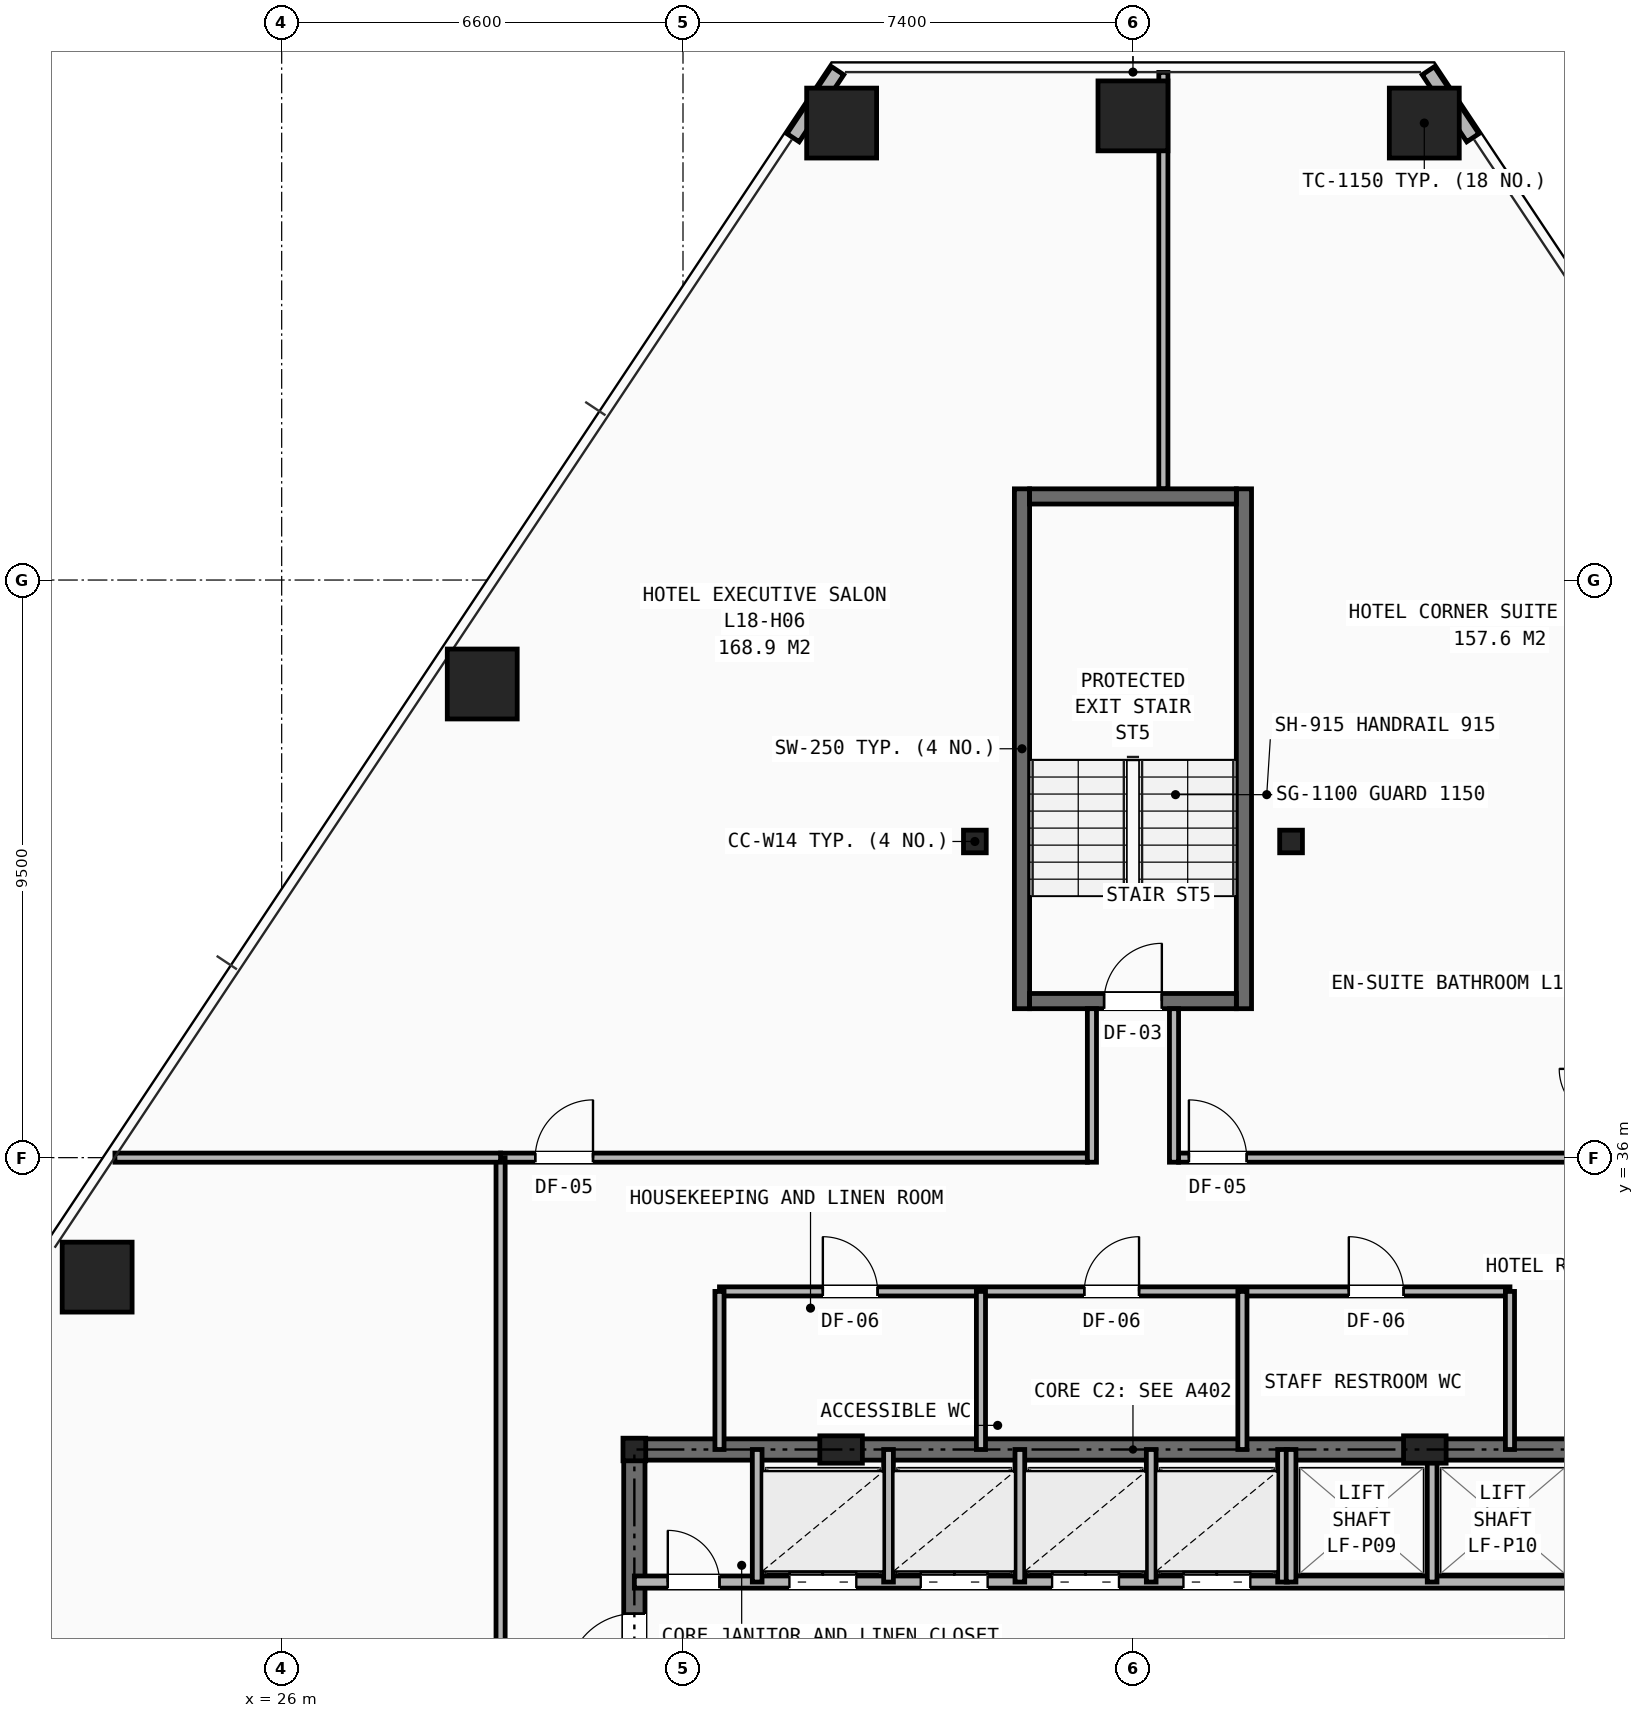
"""IFC4 building model, lengths in metres.
Left out: names, types, materials, properties, quantities, classifications, styles, units other than length and angle.
Written with IfcOpenShell. Run it as: python <this file> out.ifc"""

import sys

from ifc_helpers import new_model, si_unit, direction, frame, frame_2d, origin, origin_2d, place, context, subcontext, project, spatial, rectangle, hollow_rectangle, i_section, extrude, element, fill, save


model = new_model("IFC4")
c1 = context("Model", 3, precision=1e-05, world=origin(), true_north=direction((0.0, 1.0)))
c2 = subcontext(c1, "Body", "Model", "MODEL_VIEW")
j1 = project(units=[si_unit("LENGTHUNIT", "METRE"), si_unit("PLANEANGLEUNIT", "RADIAN")], contexts=[c1])
p1 = place(None, origin())
s1 = spatial("IfcSite", under=j1, at=p1, CompositionType="ELEMENT")
p2 = place(p1, origin())
s2 = spatial("IfcBuilding", under=s1, at=p2, CompositionType="ELEMENT")
p3 = place(p2, frame((0.0, 0.0, 65.6)))
s3 = spatial("IfcBuildingStorey", under=s2, at=p3, CompositionType="ELEMENT", Elevation=65.6)
for number, where, z_axis, x_axis in (
    (1, (31.8, 31.2, 0.0), (0.0, 0.0, 1.0), (1.0, 0.0, 0.0)),
    (2, (37.4, 41.2, 0.0), (0.0, 0.0, 1.0), (1.0, 0.0, 0.0)),
    (3, (42.6, 41.2, 0.0), (0.0, 0.0, 1.0), (1.0, 0.0, 0.0)),
):
    element("IfcColumn", number, at=place(p3, frame(where, z_axis=z_axis, x_axis=x_axis)), inside=s3, PredefinedType="COLUMN", context=c2, shape_type="SweptSolid", body=[
        extrude(i_section(OverallWidth=0.374, OverallDepth=0.372, WebThickness=0.016, FlangeThickness=0.026, at=origin_2d()), origin(), (0.0, 0.0, 1.0), 3.2),
    ])
for number, where, z_axis, x_axis in (
    (4, (35.2, 31.2, 0.0), (0.0, 0.0, 1.0), (1.0, 0.0, 0.0)),
    (5, (44.8, 31.2, 0.0), (0.0, 0.0, 1.0), (1.0, 0.0, 0.0)),
):
    element("IfcColumn", number, at=place(p3, frame(where, z_axis=z_axis, x_axis=x_axis)), inside=s3, PredefinedType="PILASTER", context=c2, shape_type="SweptSolid", body=[
        extrude(rectangle(XDim=0.7, YDim=0.45, at=origin_2d()), origin(), (0.0, 0.0, 1.0), 3.2),
    ])
for number, where, z_axis, x_axis in (
    (6, (44.791, 53.016, 0.0), (0.0, 0.0, 1.0), (1.0, 0.0, 0.0)),
    (7, (40.0, 53.134, 0.0), (0.0, 0.0, 1.0), (1.0, 0.0, 0.0)),
    (8, (35.209, 53.016, 0.0), (0.0, 0.0, 1.0), (1.0, 0.0, 0.0)),
    (9, (29.299, 43.79, 0.0), (0.0, 0.0, 1.0), (1.0, 0.0, 0.0)),
    (10, (22.965, 34.035, 0.0), (0.0, 0.0, 1.0), (1.0, 0.0, 0.0)),
):
    element("IfcColumn", number, at=place(p3, frame(where, z_axis=z_axis, x_axis=x_axis)), inside=s3, PredefinedType="COLUMN", context=c2, shape_type="SweptSolid", body=[
        extrude(hollow_rectangle(XDim=1.15, YDim=1.15, WallThickness=0.075, at=origin_2d()), origin(), (0.0, 0.0, 1.0), 3.2),
    ])
for number, where, z_axis, x_axis in (
    (11, (35.144, 53.876, 0.0), (0.0, 0.0, 1.0), (-0.554, -0.833, 0.0)),
    (12, (45.59, 52.774, 0.0), (0.0, 0.0, 1.0), (-0.554, 0.833, 0.0)),
):
    element("IfcWall", number, at=place(p3, frame(where, z_axis=z_axis, x_axis=x_axis)), inside=s3, PredefinedType="SHEAR", context=c2, shape_type="SweptSolid", body=[
        extrude(rectangle(XDim=1.323, YDim=0.24, at=frame_2d((0.662, 0.0))), origin(), (0.0, 0.0, 1.0), 2.183),
    ])
p4 = place(p3, frame((31.8, 31.2, 0.0), z_axis=(0.0, 0.0, 1.0), x_axis=(1.0, 0.0, 0.0)))
e13 = element("IfcWall", 13, at=p4, inside=s3, PredefinedType="SHEAR", context=c2, shape_type="SweptSolid", body=[
    extrude(rectangle(XDim=16.4, YDim=0.35, at=frame_2d((8.2, 0.0))), origin(), (0.0, 0.0, 1.0), 2.9),
])
p5 = place(p3, frame((31.8, 16.4, 0.0), z_axis=(0.0, 0.0, 1.0), x_axis=(0.0, 1.0, 0.0)))
e14 = element("IfcWall", 14, at=p5, inside=s3, PredefinedType="SHEAR", context=c2, shape_type="SweptSolid", body=[
    extrude(rectangle(XDim=14.8, YDim=0.35, at=frame_2d((7.4, 0.0))), origin(), (0.0, 0.0, 1.0), 2.9),
])
p6 = place(p5, frame((11.0, 0.0, 0.0)))
e15 = element("IfcOpeningElement", 15, at=p6, cuts=e14, PredefinedType="OPENING", context=c2, shape_type="SweptSolid", body=[
    extrude(rectangle(XDim=1.1, YDim=2.15, at=frame_2d((0.55, 1.075))), frame((0.0, 0.185, 0.0), z_axis=(0.0, -1.0, 0.0), x_axis=(1.0, 0.0, 0.0)), (0.0, 0.0, 1.0), 0.37),
])
p7 = place(p3, frame((31.8, 29.02, 0.0), z_axis=(0.0, 0.0, 1.0), x_axis=(1.0, 0.0, 0.0)))
e16 = element("IfcWall", 16, at=p7, inside=s3, PredefinedType="SOLIDWALL", context=c2, shape_type="SweptSolid", body=[
    extrude(rectangle(XDim=16.4, YDim=0.2, at=frame_2d((8.2, 0.0))), origin(), (0.0, 0.0, 1.0), 2.351),
])
p8 = place(p7, frame((0.55, 0.0, 0.0)))
e17 = element("IfcOpeningElement", 17, at=p8, cuts=e16, PredefinedType="OPENING", context=c2, shape_type="SweptSolid", body=[
    extrude(rectangle(XDim=0.85, YDim=2.05, at=frame_2d((0.425, 1.025))), frame((0.0, 0.11, 0.0), z_axis=(0.0, -1.0, 0.0), x_axis=(1.0, 0.0, 0.0)), (0.0, 0.0, 1.0), 0.22),
])
p9 = place(p7, frame((2.55, 0.0, 0.0)))
e18 = element("IfcOpeningElement", 18, at=p9, cuts=e16, PredefinedType="OPENING", context=c2, shape_type="SweptSolid", body=[
    extrude(rectangle(XDim=1.1, YDim=2.15, at=frame_2d((0.55, 1.075))), frame((0.0, 0.11, 0.0), z_axis=(0.0, -1.0, 0.0), x_axis=(1.0, 0.0, 0.0)), (0.0, 0.0, 1.0), 0.22),
])
p10 = place(p7, frame((4.71, 0.0, 0.0)))
e19 = element("IfcOpeningElement", 19, at=p10, cuts=e16, PredefinedType="OPENING", context=c2, shape_type="SweptSolid", body=[
    extrude(rectangle(XDim=1.1, YDim=2.15, at=frame_2d((0.55, 1.075))), frame((0.0, 0.11, 0.0), z_axis=(0.0, -1.0, 0.0), x_axis=(1.0, 0.0, 0.0)), (0.0, 0.0, 1.0), 0.22),
])
p11 = place(p7, frame((6.87, 0.0, 0.0)))
e20 = element("IfcOpeningElement", 20, at=p11, cuts=e16, PredefinedType="OPENING", context=c2, shape_type="SweptSolid", body=[
    extrude(rectangle(XDim=1.1, YDim=2.15, at=frame_2d((0.55, 1.075))), frame((0.0, 0.11, 0.0), z_axis=(0.0, -1.0, 0.0), x_axis=(1.0, 0.0, 0.0)), (0.0, 0.0, 1.0), 0.22),
])
p12 = place(p7, frame((9.03, 0.0, 0.0)))
e21 = element("IfcOpeningElement", 21, at=p12, cuts=e16, PredefinedType="OPENING", context=c2, shape_type="SweptSolid", body=[
    extrude(rectangle(XDim=1.1, YDim=2.15, at=frame_2d((0.55, 1.075))), frame((0.0, 0.11, 0.0), z_axis=(0.0, -1.0, 0.0), x_axis=(1.0, 0.0, 0.0)), (0.0, 0.0, 1.0), 0.22),
])
for number, where, z_axis, x_axis in (
    (22, (33.82, 29.02, 0.0), (0.0, 0.0, 1.0), (0.0, 1.0, 0.0)),
    (23, (35.98, 29.02, 0.0), (0.0, 0.0, 1.0), (0.0, 1.0, 0.0)),
    (24, (38.14, 29.02, 0.0), (0.0, 0.0, 1.0), (0.0, 1.0, 0.0)),
    (25, (40.3, 29.02, 0.0), (0.0, 0.0, 1.0), (0.0, 1.0, 0.0)),
    (26, (42.46, 29.02, 0.0), (0.0, 0.0, 1.0), (0.0, 1.0, 0.0)),
    (27, (42.6, 29.02, 0.0), (0.0, 0.0, 1.0), (0.0, 1.0, 0.0)),
    (28, (44.92, 29.02, 0.0), (0.0, 0.0, 1.0), (0.0, 1.0, 0.0)),
):
    element("IfcWall", number, at=place(p3, frame(where, z_axis=z_axis, x_axis=x_axis)), inside=s3, PredefinedType="SOLIDWALL", context=c2, shape_type="SweptSolid", body=[
        extrude(rectangle(XDim=2.18, YDim=0.16, at=frame_2d((1.09, 0.0))), origin(), (0.0, 0.0, 1.0), 2.351),
    ])
p13 = place(p3, frame((33.2, 33.8, 0.0), z_axis=(0.0, 0.0, 1.0), x_axis=(1.0, 0.0, 0.0)))
e29 = element("IfcWall", 29, at=p13, inside=s3, PredefinedType="PARTITIONING", context=c2, shape_type="SweptSolid", body=[
    extrude(rectangle(XDim=13.0, YDim=0.15, at=frame_2d((6.5, 0.0))), origin(), (0.0, 0.0, 1.0), 2.9),
])
p14 = place(p13, frame((1.7, 0.0, 0.0)))
e30 = element("IfcOpeningElement", 30, at=p14, cuts=e29, PredefinedType="OPENING", context=c2, shape_type="SweptSolid", body=[
    extrude(rectangle(XDim=0.9, YDim=2.1, at=frame_2d((0.45, 1.05))), frame((0.0, 0.085, 0.0), z_axis=(0.0, -1.0, 0.0), x_axis=(1.0, 0.0, 0.0)), (0.0, 0.0, 1.0), 0.17),
])
p15 = place(p13, frame((6.0, 0.0, 0.0)))
e31 = element("IfcOpeningElement", 31, at=p15, cuts=e29, PredefinedType="OPENING", context=c2, shape_type="SweptSolid", body=[
    extrude(rectangle(XDim=0.9, YDim=2.1, at=frame_2d((0.45, 1.05))), frame((0.0, 0.085, 0.0), z_axis=(0.0, -1.0, 0.0), x_axis=(1.0, 0.0, 0.0)), (0.0, 0.0, 1.0), 0.17),
])
p16 = place(p13, frame((10.35, 0.0, 0.0)))
e32 = element("IfcOpeningElement", 32, at=p16, cuts=e29, PredefinedType="OPENING", context=c2, shape_type="SweptSolid", body=[
    extrude(rectangle(XDim=0.9, YDim=2.1, at=frame_2d((0.45, 1.05))), frame((0.0, 0.085, 0.0), z_axis=(0.0, -1.0, 0.0), x_axis=(1.0, 0.0, 0.0)), (0.0, 0.0, 1.0), 0.17),
])
for number, where, z_axis, x_axis in (
    (33, (33.2, 31.2, 0.0), (0.0, 0.0, 1.0), (0.0, 1.0, 0.0)),
    (34, (46.2, 31.2, 0.0), (0.0, 0.0, 1.0), (0.0, 1.0, 0.0)),
    (35, (37.5, 31.2, 0.0), (0.0, 0.0, 1.0), (0.0, 1.0, 0.0)),
    (36, (41.8, 31.2, 0.0), (0.0, 0.0, 1.0), (0.0, 1.0, 0.0)),
):
    element("IfcWall", number, at=place(p3, frame(where, z_axis=z_axis, x_axis=x_axis)), inside=s3, PredefinedType="PARTITIONING", context=c2, shape_type="SweptSolid", body=[
        extrude(rectangle(XDim=2.6, YDim=0.15, at=frame_2d((1.3, 0.0))), origin(), (0.0, 0.0, 1.0), 2.351),
    ])
p17 = place(p3, frame((29.6, 36.0, 0.0), z_axis=(0.0, 0.0, 1.0), x_axis=(1.0, 0.0, 0.0)))
e37 = element("IfcWall", 37, at=p17, inside=s3, PredefinedType="PARTITIONING", context=c2, shape_type="SweptSolid", body=[
    extrude(rectangle(XDim=9.65, YDim=0.15, at=frame_2d((4.825, 0.0))), origin(), (0.0, 0.0, 1.0), 2.9),
])
p18 = place(p17, frame((0.57, 0.0, 0.0)))
e38 = element("IfcOpeningElement", 38, at=p18, cuts=e37, PredefinedType="OPENING", context=c2, shape_type="SweptSolid", body=[
    extrude(rectangle(XDim=0.95, YDim=2.1, at=frame_2d((0.475, 1.05))), frame((0.0, 0.085, 0.0), z_axis=(0.0, -1.0, 0.0), x_axis=(1.0, 0.0, 0.0)), (0.0, 0.0, 1.0), 0.17),
])
p19 = place(p3, frame((40.75, 36.0, 0.0), z_axis=(0.0, 0.0, 1.0), x_axis=(1.0, 0.0, 0.0)))
e39 = element("IfcWall", 39, at=p19, inside=s3, PredefinedType="PARTITIONING", context=c2, shape_type="SweptSolid", body=[
    extrude(rectangle(XDim=9.65, YDim=0.15, at=frame_2d((4.825, 0.0))), origin(), (0.0, 0.0, 1.0), 2.433),
])
p20 = place(p19, frame((0.17, 0.0, 0.0)))
e40 = element("IfcOpeningElement", 40, at=p20, cuts=e39, PredefinedType="OPENING", context=c2, shape_type="SweptSolid", body=[
    extrude(rectangle(XDim=0.95, YDim=2.1, at=frame_2d((0.475, 1.05))), frame((0.0, 0.085, 0.0), z_axis=(0.0, -1.0, 0.0), x_axis=(1.0, 0.0, 0.0)), (0.0, 0.0, 1.0), 0.17),
])
p21 = place(p3, frame((29.6, 14.1, 0.0), z_axis=(0.0, 0.0, 1.0), x_axis=(0.0, 1.0, 0.0)))
e41 = element("IfcWall", 41, at=p21, inside=s3, PredefinedType="PARTITIONING", context=c2, shape_type="SweptSolid", body=[
    extrude(rectangle(XDim=21.9, YDim=0.15, at=frame_2d((10.95, 0.0))), origin(), (0.0, 0.0, 1.0), 2.351),
])
p22 = place(p21, frame((0.42, 0.0, 0.0)))
e42 = element("IfcOpeningElement", 42, at=p22, cuts=e41, PredefinedType="OPENING", context=c2, shape_type="SweptSolid", body=[
    extrude(rectangle(XDim=0.95, YDim=2.1, at=frame_2d((0.475, 1.05))), frame((0.0, 0.085, 0.0), z_axis=(0.0, -1.0, 0.0), x_axis=(1.0, 0.0, 0.0)), (0.0, 0.0, 1.0), 0.17),
])
p23 = place(p3, frame((23.257, 36.0, 0.0), z_axis=(0.0, 0.0, 1.0), x_axis=(1.0, 0.0, 0.0)))
e43 = element("IfcWall", 43, at=p23, inside=s3, PredefinedType="PARTITIONING", context=c2, shape_type="SweptSolid", body=[
    extrude(rectangle(XDim=6.343, YDim=0.15, at=frame_2d((3.171, 0.0))), origin(), (0.0, 0.0, 1.0), 2.188),
])
p24 = place(p3, frame((40.5, 47.0, 0.0), z_axis=(0.0, 0.0, 1.0), x_axis=(0.0, 1.0, 0.0)))
e44 = element("IfcWall", 44, at=p24, inside=s3, PredefinedType="PARTITIONING", context=c2, shape_type="SweptSolid", body=[
    extrude(rectangle(XDim=6.849, YDim=0.15, at=frame_2d((3.425, 0.0))), origin(), (0.0, 0.0, 1.0), 2.188),
])
for number, where, z_axis, x_axis in (
    (45, (38.175, 38.45, 0.0), (0.0, 0.0, 1.0), (0.0, 1.0, 0.0)),
    (46, (41.825, 38.45, 0.0), (0.0, 0.0, 1.0), (0.0, 1.0, 0.0)),
):
    element("IfcWall", number, at=place(p3, frame(where, z_axis=z_axis, x_axis=x_axis)), inside=s3, PredefinedType="SHEAR", context=c2, shape_type="SweptSolid", body=[
        extrude(rectangle(XDim=8.55, YDim=0.25, at=frame_2d((4.275, 0.0))), origin(), (0.0, 0.0, 1.0), 2.9),
    ])
p25 = place(p3, frame((38.3, 38.575, 0.0), z_axis=(0.0, 0.0, 1.0), x_axis=(1.0, 0.0, 0.0)))
e47 = element("IfcWall", 47, at=p25, inside=s3, PredefinedType="SHEAR", context=c2, shape_type="SweptSolid", body=[
    extrude(rectangle(XDim=3.4, YDim=0.25, at=frame_2d((1.7, 0.0))), origin(), (0.0, 0.0, 1.0), 2.9),
])
p26 = place(p25, frame((1.225, 0.0, 0.0)))
e48 = element("IfcOpeningElement", 48, at=p26, cuts=e47, PredefinedType="OPENING", context=c2, shape_type="SweptSolid", body=[
    extrude(rectangle(XDim=0.95, YDim=2.1, at=frame_2d((0.475, 1.05))), frame((0.0, 0.135, 0.0), z_axis=(0.0, -1.0, 0.0), x_axis=(1.0, 0.0, 0.0)), (0.0, 0.0, 1.0), 0.27),
])
p27 = place(p3, frame((38.3, 46.875, 0.0), z_axis=(0.0, 0.0, 1.0), x_axis=(1.0, 0.0, 0.0)))
e49 = element("IfcWall", 49, at=p27, inside=s3, PredefinedType="SHEAR", context=c2, shape_type="SweptSolid", body=[
    extrude(rectangle(XDim=3.4, YDim=0.25, at=frame_2d((1.7, 0.0))), origin(), (0.0, 0.0, 1.0), 2.9),
])
for number, where, z_axis, x_axis in (
    (50, (39.325, 35.925, 0.0), (0.0, 0.0, 1.0), (0.0, 1.0, 0.0)),
    (51, (40.675, 35.925, 0.0), (0.0, 0.0, 1.0), (0.0, 1.0, 0.0)),
):
    element("IfcWall", number, at=place(p3, frame(where, z_axis=z_axis, x_axis=x_axis)), inside=s3, PredefinedType="PARTITIONING", context=c2, shape_type="SweptSolid", body=[
        extrude(rectangle(XDim=2.525, YDim=0.15, at=frame_2d((1.262, 0.0))), origin(), (0.0, 0.0, 1.0), 2.9),
    ])
p28 = place(p8, origin())
e52 = element("IfcDoor", 52, at=p28, inside=s3, OperationType="SINGLE_SWING_LEFT", PredefinedType="DOOR", context=c2, shape_type="SweptSolid", body=[
    extrude(rectangle(XDim=0.85, YDim=2.05, at=frame_2d((0.425, 1.025))), frame((0.0, 0.025, 0.0), z_axis=(0.0, -1.0, 0.0), x_axis=(1.0, 0.0, 0.0)), (0.0, 0.0, 1.0), 0.05),
])
fill(e17, e52)
p29 = place(p6, origin())
e53 = element("IfcDoor", 53, at=p29, inside=s3, OperationType="SINGLE_SWING_LEFT", PredefinedType="DOOR", context=c2, shape_type="SweptSolid", body=[
    extrude(rectangle(XDim=1.1, YDim=2.15, at=frame_2d((0.55, 1.075))), frame((0.0, 0.025, 0.0), z_axis=(0.0, -1.0, 0.0), x_axis=(1.0, 0.0, 0.0)), (0.0, 0.0, 1.0), 0.05),
])
fill(e15, e53)
p30 = place(p9, origin())
e54 = element("IfcDoor", 54, at=p30, inside=s3, OperationType="DOUBLE_DOOR_SLIDING", PredefinedType="DOOR", context=c2, shape_type="SweptSolid", body=[
    extrude(rectangle(XDim=1.1, YDim=2.15, at=frame_2d((0.55, 1.075))), frame((0.0, 0.025, 0.0), z_axis=(0.0, -1.0, 0.0), x_axis=(1.0, 0.0, 0.0)), (0.0, 0.0, 1.0), 0.05),
])
fill(e18, e54)
p31 = place(p10, origin())
e55 = element("IfcDoor", 55, at=p31, inside=s3, OperationType="DOUBLE_DOOR_SLIDING", PredefinedType="DOOR", context=c2, shape_type="SweptSolid", body=[
    extrude(rectangle(XDim=1.1, YDim=2.15, at=frame_2d((0.55, 1.075))), frame((0.0, 0.025, 0.0), z_axis=(0.0, -1.0, 0.0), x_axis=(1.0, 0.0, 0.0)), (0.0, 0.0, 1.0), 0.05),
])
fill(e19, e55)
p32 = place(p11, origin())
e56 = element("IfcDoor", 56, at=p32, inside=s3, OperationType="DOUBLE_DOOR_SLIDING", PredefinedType="DOOR", context=c2, shape_type="SweptSolid", body=[
    extrude(rectangle(XDim=1.1, YDim=2.15, at=frame_2d((0.55, 1.075))), frame((0.0, 0.025, 0.0), z_axis=(0.0, -1.0, 0.0), x_axis=(1.0, 0.0, 0.0)), (0.0, 0.0, 1.0), 0.05),
])
fill(e20, e56)
p33 = place(p12, origin())
e57 = element("IfcDoor", 57, at=p33, inside=s3, OperationType="DOUBLE_DOOR_SLIDING", PredefinedType="DOOR", context=c2, shape_type="SweptSolid", body=[
    extrude(rectangle(XDim=1.1, YDim=2.15, at=frame_2d((0.55, 1.075))), frame((0.0, 0.025, 0.0), z_axis=(0.0, -1.0, 0.0), x_axis=(1.0, 0.0, 0.0)), (0.0, 0.0, 1.0), 0.05),
])
fill(e21, e57)
p34 = place(p14, origin())
e58 = element("IfcDoor", 58, at=p34, inside=s3, OperationType="SINGLE_SWING_LEFT", PredefinedType="DOOR", context=c2, shape_type="SweptSolid", body=[
    extrude(rectangle(XDim=0.9, YDim=2.1, at=frame_2d((0.45, 1.05))), frame((0.0, 0.025, 0.0), z_axis=(0.0, -1.0, 0.0), x_axis=(1.0, 0.0, 0.0)), (0.0, 0.0, 1.0), 0.05),
])
fill(e30, e58)
p35 = place(p15, origin())
e59 = element("IfcDoor", 59, at=p35, inside=s3, OperationType="SINGLE_SWING_RIGHT", PredefinedType="DOOR", context=c2, shape_type="SweptSolid", body=[
    extrude(rectangle(XDim=0.9, YDim=2.1, at=frame_2d((0.45, 1.05))), frame((0.0, 0.025, 0.0), z_axis=(0.0, -1.0, 0.0), x_axis=(1.0, 0.0, 0.0)), (0.0, 0.0, 1.0), 0.05),
])
fill(e31, e59)
p36 = place(p16, origin())
e60 = element("IfcDoor", 60, at=p36, inside=s3, OperationType="SINGLE_SWING_LEFT", PredefinedType="DOOR", context=c2, shape_type="SweptSolid", body=[
    extrude(rectangle(XDim=0.9, YDim=2.1, at=frame_2d((0.45, 1.05))), frame((0.0, 0.025, 0.0), z_axis=(0.0, -1.0, 0.0), x_axis=(1.0, 0.0, 0.0)), (0.0, 0.0, 1.0), 0.05),
])
fill(e32, e60)
p37 = place(p18, origin())
e61 = element("IfcDoor", 61, at=p37, inside=s3, OperationType="SINGLE_SWING_RIGHT", PredefinedType="DOOR", context=c2, shape_type="SweptSolid", body=[
    extrude(rectangle(XDim=0.95, YDim=2.1, at=frame_2d((0.475, 1.05))), frame((0.0, 0.025, 0.0), z_axis=(0.0, -1.0, 0.0), x_axis=(1.0, 0.0, 0.0)), (0.0, 0.0, 1.0), 0.05),
])
fill(e38, e61)
p38 = place(p20, origin())
e62 = element("IfcDoor", 62, at=p38, inside=s3, OperationType="SINGLE_SWING_LEFT", PredefinedType="DOOR", context=c2, shape_type="SweptSolid", body=[
    extrude(rectangle(XDim=0.95, YDim=2.1, at=frame_2d((0.475, 1.05))), frame((0.0, 0.025, 0.0), z_axis=(0.0, -1.0, 0.0), x_axis=(1.0, 0.0, 0.0)), (0.0, 0.0, 1.0), 0.05),
])
fill(e40, e62)
p39 = place(p26, origin())
e63 = element("IfcDoor", 63, at=p39, inside=s3, OperationType="SINGLE_SWING_RIGHT", PredefinedType="DOOR", context=c2, shape_type="SweptSolid", body=[
    extrude(rectangle(XDim=0.95, YDim=2.1, at=frame_2d((0.475, 1.05))), frame((0.0, 0.025, 0.0), z_axis=(0.0, -1.0, 0.0), x_axis=(1.0, 0.0, 0.0)), (0.0, 0.0, 1.0), 0.05),
])
fill(e48, e63)
save(model, sys.argv[1])
